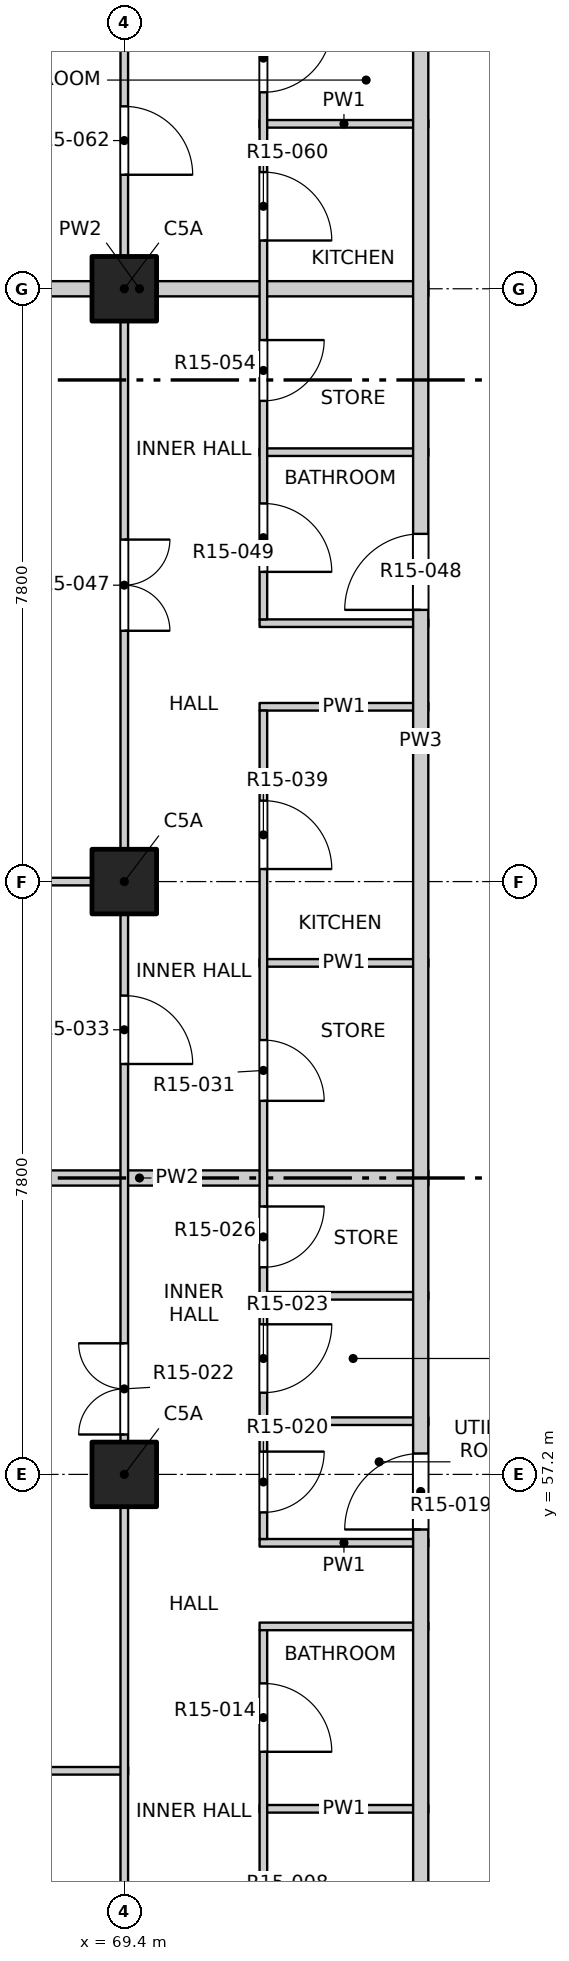
"""IFC4 building model, lengths in metres.
Left out: names, types, materials, properties, quantities, classifications, styles, units other than length and angle.
Written with IfcOpenShell. Run it as: python <this file> out.ifc"""

import sys

from ifc_helpers import new_model, si_unit, direction, frame, frame_2d, origin, origin_2d, place, context, subcontext, project, spatial, rectangle, extrude, element, fill, save


model = new_model("IFC4")
c1 = context("Model", 3, precision=1e-05, world=origin(), true_north=direction((0.0, 1.0)))
c2 = subcontext(c1, "Body", "Model", "MODEL_VIEW")
j1 = project(units=[si_unit("LENGTHUNIT", "METRE"), si_unit("PLANEANGLEUNIT", "RADIAN")], contexts=[c1])
p1 = place(None, origin())
s1 = spatial("IfcSite", under=j1, at=p1, CompositionType="ELEMENT")
p2 = place(p1, origin())
s2 = spatial("IfcBuilding", under=s1, at=p2, CompositionType="ELEMENT")
p3 = place(p2, frame((0.0, 0.0, 158.8)))
s3 = spatial("IfcBuildingStorey", under=s2, at=p3, CompositionType="ELEMENT", Elevation=158.8)
for number, where, z_axis, x_axis in (
    (1, (69.4, 57.2, -0.25), (0.0, 0.0, 1.0), (1.0, 0.0, 0.0)),
    (2, (69.4, 65.0, -0.25), (0.0, 0.0, 1.0), (1.0, 0.0, 0.0)),
    (3, (69.4, 72.8, -0.25), (0.0, 0.0, 1.0), (1.0, 0.0, 0.0)),
):
    element("IfcColumn", number, at=place(p3, frame(where, z_axis=z_axis, x_axis=x_axis)), inside=s3, PredefinedType="COLUMN", context=c2, shape_type="SweptSolid", body=[
        extrude(rectangle(XDim=0.85, YDim=0.85, at=origin_2d()), origin(), (0.0, 0.0, 1.0), 3.4),
    ])
p4 = place(p3, frame((71.18, 52.8, 0.0), z_axis=(0.0, 0.0, 1.0), x_axis=(1.0, 0.0, 0.0)))
e4 = element("IfcWall", 4, at=p4, inside=s3, PredefinedType="PARTITIONING", context=c2, shape_type="SweptSolid", body=[
    extrude(rectangle(XDim=2.22, YDim=0.1, at=frame_2d((1.11, 0.0))), origin(), (0.0, 0.0, 1.0), 3.15),
])
p5 = place(p3, frame((65.8, 53.3, 0.0), z_axis=(0.0, 0.0, 1.0), x_axis=(1.0, 0.0, 0.0)))
e5 = element("IfcWall", 5, at=p5, inside=s3, PredefinedType="PARTITIONING", context=c2, shape_type="SweptSolid", body=[
    extrude(rectangle(XDim=3.65, YDim=0.1, at=frame_2d((1.825, 0.0))), origin(), (0.0, 0.0, 1.0), 3.15),
])
for number, where, z_axis, x_axis in (
    (6, (71.18, 55.2, 0.0), (0.0, 0.0, 1.0), (1.0, 0.0, 0.0)),
    (7, (71.18, 56.3, 0.0), (0.0, 0.0, 1.0), (1.0, 0.0, 0.0)),
    (8, (71.18, 57.9, 0.0), (0.0, 0.0, 1.0), (1.0, 0.0, 0.0)),
    (9, (71.18, 59.55, 0.0), (0.0, 0.0, 1.0), (1.0, 0.0, 0.0)),
):
    element("IfcWall", number, at=place(p3, frame(where, z_axis=z_axis, x_axis=x_axis)), inside=s3, PredefinedType="PARTITIONING", context=c2, shape_type="SweptSolid", body=[
        extrude(rectangle(XDim=2.22, YDim=0.1, at=frame_2d((1.11, 0.0))), origin(), (0.0, 0.0, 1.0), 3.15),
    ])
p6 = place(p3, frame((65.8, 61.1, 0.0), z_axis=(0.0, 0.0, 1.0), x_axis=(1.0, 0.0, 0.0)))
e10 = element("IfcWall", 10, at=p6, inside=s3, PredefinedType="PARTITIONING", context=c2, shape_type="SweptSolid", body=[
    extrude(rectangle(XDim=7.6, YDim=0.2, at=frame_2d((3.8, 0.0))), origin(), (0.0, 0.0, 1.0), 2.55),
])
p7 = place(p3, frame((71.18, 63.93, 0.0), z_axis=(0.0, 0.0, 1.0), x_axis=(1.0, 0.0, 0.0)))
e11 = element("IfcWall", 11, at=p7, inside=s3, PredefinedType="PARTITIONING", context=c2, shape_type="SweptSolid", body=[
    extrude(rectangle(XDim=2.22, YDim=0.1, at=frame_2d((1.11, 0.0))), origin(), (0.0, 0.0, 1.0), 3.15),
])
p8 = place(p3, frame((65.8, 65.0, 0.0), z_axis=(0.0, 0.0, 1.0), x_axis=(1.0, 0.0, 0.0)))
e12 = element("IfcWall", 12, at=p8, inside=s3, PredefinedType="PARTITIONING", context=c2, shape_type="SweptSolid", body=[
    extrude(rectangle(XDim=3.65, YDim=0.1, at=frame_2d((1.825, 0.0))), origin(), (0.0, 0.0, 1.0), 3.15),
])
for number, where, z_axis, x_axis in (
    (13, (71.18, 67.3, 0.0), (0.0, 0.0, 1.0), (1.0, 0.0, 0.0)),
    (14, (71.18, 68.4, 0.0), (0.0, 0.0, 1.0), (1.0, 0.0, 0.0)),
    (15, (71.18, 70.65, 0.0), (0.0, 0.0, 1.0), (1.0, 0.0, 0.0)),
):
    element("IfcWall", number, at=place(p3, frame(where, z_axis=z_axis, x_axis=x_axis)), inside=s3, PredefinedType="PARTITIONING", context=c2, shape_type="SweptSolid", body=[
        extrude(rectangle(XDim=2.22, YDim=0.1, at=frame_2d((1.11, 0.0))), origin(), (0.0, 0.0, 1.0), 3.15),
    ])
p9 = place(p3, frame((65.8, 72.8, 0.0), z_axis=(0.0, 0.0, 1.0), x_axis=(1.0, 0.0, 0.0)))
e16 = element("IfcWall", 16, at=p9, inside=s3, PredefinedType="PARTITIONING", context=c2, shape_type="SweptSolid", body=[
    extrude(rectangle(XDim=7.6, YDim=0.2, at=frame_2d((3.8, 0.0))), origin(), (0.0, 0.0, 1.0), 3.15),
])
p10 = place(p3, frame((71.18, 74.97, 0.0), z_axis=(0.0, 0.0, 1.0), x_axis=(1.0, 0.0, 0.0)))
e17 = element("IfcWall", 17, at=p10, inside=s3, PredefinedType="PARTITIONING", context=c2, shape_type="SweptSolid", body=[
    extrude(rectangle(XDim=2.22, YDim=0.1, at=frame_2d((1.11, 0.0))), origin(), (0.0, 0.0, 1.0), 3.15),
])
p11 = place(p3, frame((69.4, 45.8, 0.0), z_axis=(0.0, 0.0, 1.0), x_axis=(0.0, 1.0, 0.0)))
e18 = element("IfcWall", 18, at=p11, inside=s3, PredefinedType="PARTITIONING", context=c2, shape_type="SweptSolid", body=[
    extrude(rectangle(XDim=38.4, YDim=0.1, at=frame_2d((19.2, 0.0))), origin(), (0.0, 0.0, 1.0), 3.15),
])
p12 = place(p11, frame((1.05, 0.0, 0.0)))
e19 = element("IfcOpeningElement", 19, at=p12, cuts=e18, PredefinedType="OPENING", context=c2, shape_type="SweptSolid", body=[
    extrude(rectangle(XDim=1.2, YDim=2.1, at=frame_2d((0.6, 1.05))), frame((0.0, 0.06, 0.0), z_axis=(0.0, -1.0, 0.0), x_axis=(1.0, 0.0, 0.0)), (0.0, 0.0, 1.0), 0.12),
])
p13 = place(p11, frame((5.1, 0.0, 0.0)))
e20 = element("IfcOpeningElement", 20, at=p13, cuts=e18, PredefinedType="OPENING", context=c2, shape_type="SweptSolid", body=[
    extrude(rectangle(XDim=0.9, YDim=2.1, at=frame_2d((0.45, 1.05))), frame((0.0, 0.06, 0.0), z_axis=(0.0, -1.0, 0.0), x_axis=(1.0, 0.0, 0.0)), (0.0, 0.0, 1.0), 0.12),
])
p14 = place(p11, frame((11.925, 0.0, 0.0)))
e21 = element("IfcOpeningElement", 21, at=p14, cuts=e18, PredefinedType="OPENING", context=c2, shape_type="SweptSolid", body=[
    extrude(rectangle(XDim=1.2, YDim=2.1, at=frame_2d((0.6, 1.05))), frame((0.0, 0.06, 0.0), z_axis=(0.0, -1.0, 0.0), x_axis=(1.0, 0.0, 0.0)), (0.0, 0.0, 1.0), 0.12),
])
p15 = place(p11, frame((16.8, 0.0, 0.0)))
e22 = element("IfcOpeningElement", 22, at=p15, cuts=e18, PredefinedType="OPENING", context=c2, shape_type="SweptSolid", body=[
    extrude(rectangle(XDim=0.9, YDim=2.1, at=frame_2d((0.45, 1.05))), frame((0.0, 0.06, 0.0), z_axis=(0.0, -1.0, 0.0), x_axis=(1.0, 0.0, 0.0)), (0.0, 0.0, 1.0), 0.12),
])
p16 = place(p11, frame((22.5, 0.0, 0.0)))
e23 = element("IfcOpeningElement", 23, at=p16, cuts=e18, PredefinedType="OPENING", context=c2, shape_type="SweptSolid", body=[
    extrude(rectangle(XDim=1.2, YDim=2.1, at=frame_2d((0.6, 1.05))), frame((0.0, 0.06, 0.0), z_axis=(0.0, -1.0, 0.0), x_axis=(1.0, 0.0, 0.0)), (0.0, 0.0, 1.0), 0.12),
])
p17 = place(p11, frame((28.5, 0.0, 0.0)))
e24 = element("IfcOpeningElement", 24, at=p17, cuts=e18, PredefinedType="OPENING", context=c2, shape_type="SweptSolid", body=[
    extrude(rectangle(XDim=0.9, YDim=2.1, at=frame_2d((0.45, 1.05))), frame((0.0, 0.06, 0.0), z_axis=(0.0, -1.0, 0.0), x_axis=(1.0, 0.0, 0.0)), (0.0, 0.0, 1.0), 0.12),
])
p18 = place(p11, frame((32.4, 0.0, 0.0)))
e25 = element("IfcOpeningElement", 25, at=p18, cuts=e18, PredefinedType="OPENING", context=c2, shape_type="SweptSolid", body=[
    extrude(rectangle(XDim=0.9, YDim=2.1, at=frame_2d((0.45, 1.05))), frame((0.0, 0.06, 0.0), z_axis=(0.0, -1.0, 0.0), x_axis=(1.0, 0.0, 0.0)), (0.0, 0.0, 1.0), 0.12),
])
p19 = place(p11, frame((36.15, 0.0, 0.0)))
e26 = element("IfcOpeningElement", 26, at=p19, cuts=e18, PredefinedType="OPENING", context=c2, shape_type="SweptSolid", body=[
    extrude(rectangle(XDim=1.2, YDim=2.1, at=frame_2d((0.6, 1.05))), frame((0.0, 0.06, 0.0), z_axis=(0.0, -1.0, 0.0), x_axis=(1.0, 0.0, 0.0)), (0.0, 0.0, 1.0), 0.12),
])
p20 = place(p3, frame((71.23, 49.45, 0.0), z_axis=(0.0, 0.0, 1.0), x_axis=(0.0, 1.0, 0.0)))
e27 = element("IfcWall", 27, at=p20, inside=s3, PredefinedType="PARTITIONING", context=c2, shape_type="SweptSolid", body=[
    extrude(rectangle(XDim=5.7, YDim=0.1, at=frame_2d((2.85, 0.0))), origin(), (0.0, 0.0, 1.0), 3.15),
])
p21 = place(p20, frame((1.2, 0.0, 0.0)))
e28 = element("IfcOpeningElement", 28, at=p21, cuts=e27, PredefinedType="OPENING", context=c2, shape_type="SweptSolid", body=[
    extrude(rectangle(XDim=0.9, YDim=2.1, at=frame_2d((0.45, 1.05))), frame((0.0, 0.06, 0.0), z_axis=(0.0, -1.0, 0.0), x_axis=(1.0, 0.0, 0.0)), (0.0, 0.0, 1.0), 0.12),
])
p22 = place(p20, frame((4.1, 0.0, 0.0)))
e29 = element("IfcOpeningElement", 29, at=p22, cuts=e27, PredefinedType="OPENING", context=c2, shape_type="SweptSolid", body=[
    extrude(rectangle(XDim=0.9, YDim=2.1, at=frame_2d((0.45, 1.05))), frame((0.0, 0.06, 0.0), z_axis=(0.0, -1.0, 0.0), x_axis=(1.0, 0.0, 0.0)), (0.0, 0.0, 1.0), 0.12),
])
p23 = place(p3, frame((71.23, 56.35, 0.0), z_axis=(0.0, 0.0, 1.0), x_axis=(0.0, 1.0, 0.0)))
e30 = element("IfcWall", 30, at=p23, inside=s3, PredefinedType="PARTITIONING", context=c2, shape_type="SweptSolid", body=[
    extrude(rectangle(XDim=10.9, YDim=0.1, at=frame_2d((5.45, 0.0))), origin(), (0.0, 0.0, 1.0), 3.15),
])
p24 = place(p23, frame((0.35, 0.0, 0.0)))
e31 = element("IfcOpeningElement", 31, at=p24, cuts=e30, PredefinedType="OPENING", context=c2, shape_type="SweptSolid", body=[
    extrude(rectangle(XDim=0.8, YDim=2.1, at=frame_2d((0.4, 1.05))), frame((0.0, 0.06, 0.0), z_axis=(0.0, -1.0, 0.0), x_axis=(1.0, 0.0, 0.0)), (0.0, 0.0, 1.0), 0.12),
])
p25 = place(p23, frame((1.925, 0.0, 0.0)))
e32 = element("IfcOpeningElement", 32, at=p25, cuts=e30, PredefinedType="OPENING", context=c2, shape_type="SweptSolid", body=[
    extrude(rectangle(XDim=0.9, YDim=2.1, at=frame_2d((0.45, 1.05))), frame((0.0, 0.06, 0.0), z_axis=(0.0, -1.0, 0.0), x_axis=(1.0, 0.0, 0.0)), (0.0, 0.0, 1.0), 0.12),
])
p26 = place(p23, frame((3.575, 0.0, 0.0)))
e33 = element("IfcOpeningElement", 33, at=p26, cuts=e30, PredefinedType="OPENING", context=c2, shape_type="SweptSolid", body=[
    extrude(rectangle(XDim=0.8, YDim=2.1, at=frame_2d((0.4, 1.05))), frame((0.0, 0.06, 0.0), z_axis=(0.0, -1.0, 0.0), x_axis=(1.0, 0.0, 0.0)), (0.0, 0.0, 1.0), 0.12),
])
p27 = place(p23, frame((5.765, 0.0, 0.0)))
e34 = element("IfcOpeningElement", 34, at=p27, cuts=e30, PredefinedType="OPENING", context=c2, shape_type="SweptSolid", body=[
    extrude(rectangle(XDim=0.8, YDim=2.1, at=frame_2d((0.4, 1.05))), frame((0.0, 0.06, 0.0), z_axis=(0.0, -1.0, 0.0), x_axis=(1.0, 0.0, 0.0)), (0.0, 0.0, 1.0), 0.12),
])
p28 = place(p23, frame((8.815, 0.0, 0.0)))
e35 = element("IfcOpeningElement", 35, at=p28, cuts=e30, PredefinedType="OPENING", context=c2, shape_type="SweptSolid", body=[
    extrude(rectangle(XDim=0.9, YDim=2.1, at=frame_2d((0.45, 1.05))), frame((0.0, 0.06, 0.0), z_axis=(0.0, -1.0, 0.0), x_axis=(1.0, 0.0, 0.0)), (0.0, 0.0, 1.0), 0.12),
])
p29 = place(p3, frame((71.23, 68.45, 0.0), z_axis=(0.0, 0.0, 1.0), x_axis=(0.0, 1.0, 0.0)))
e36 = element("IfcWall", 36, at=p29, inside=s3, PredefinedType="PARTITIONING", context=c2, shape_type="SweptSolid", body=[
    extrude(rectangle(XDim=9.85, YDim=0.1, at=frame_2d((4.925, 0.0))), origin(), (0.0, 0.0, 1.0), 3.15),
])
p30 = place(p29, frame((0.625, 0.0, 0.0)))
e37 = element("IfcOpeningElement", 37, at=p30, cuts=e36, PredefinedType="OPENING", context=c2, shape_type="SweptSolid", body=[
    extrude(rectangle(XDim=0.9, YDim=2.1, at=frame_2d((0.45, 1.05))), frame((0.0, 0.06, 0.0), z_axis=(0.0, -1.0, 0.0), x_axis=(1.0, 0.0, 0.0)), (0.0, 0.0, 1.0), 0.12),
])
p31 = place(p29, frame((2.875, 0.0, 0.0)))
e38 = element("IfcOpeningElement", 38, at=p31, cuts=e36, PredefinedType="OPENING", context=c2, shape_type="SweptSolid", body=[
    extrude(rectangle(XDim=0.8, YDim=2.1, at=frame_2d((0.4, 1.05))), frame((0.0, 0.06, 0.0), z_axis=(0.0, -1.0, 0.0), x_axis=(1.0, 0.0, 0.0)), (0.0, 0.0, 1.0), 0.12),
])
p32 = place(p29, frame((4.985, 0.0, 0.0)))
e39 = element("IfcOpeningElement", 39, at=p32, cuts=e36, PredefinedType="OPENING", context=c2, shape_type="SweptSolid", body=[
    extrude(rectangle(XDim=0.9, YDim=2.1, at=frame_2d((0.45, 1.05))), frame((0.0, 0.06, 0.0), z_axis=(0.0, -1.0, 0.0), x_axis=(1.0, 0.0, 0.0)), (0.0, 0.0, 1.0), 0.12),
])
p33 = place(p29, frame((6.935, 0.0, 0.0)))
e40 = element("IfcOpeningElement", 40, at=p33, cuts=e36, PredefinedType="OPENING", context=c2, shape_type="SweptSolid", body=[
    extrude(rectangle(XDim=0.9, YDim=2.1, at=frame_2d((0.45, 1.05))), frame((0.0, 0.06, 0.0), z_axis=(0.0, -1.0, 0.0), x_axis=(1.0, 0.0, 0.0)), (0.0, 0.0, 1.0), 0.12),
])
p34 = place(p29, frame((8.625, 0.0, 0.0)))
e41 = element("IfcOpeningElement", 41, at=p34, cuts=e36, PredefinedType="OPENING", context=c2, shape_type="SweptSolid", body=[
    extrude(rectangle(XDim=0.9, YDim=2.1, at=frame_2d((0.45, 1.05))), frame((0.0, 0.06, 0.0), z_axis=(0.0, -1.0, 0.0), x_axis=(1.0, 0.0, 0.0)), (0.0, 0.0, 1.0), 0.12),
])
p35 = place(p3, frame((73.3, 49.5, 0.0), z_axis=(0.0, 0.0, 1.0), x_axis=(0.0, 1.0, 0.0)))
e42 = element("IfcWall", 42, at=p35, inside=s3, PredefinedType="PARTITIONING", context=c2, shape_type="SweptSolid", body=[
    extrude(rectangle(XDim=34.7, YDim=0.2, at=frame_2d((17.35, 0.0))), origin(), (0.0, 0.0, 1.0), 3.15),
])
p36 = place(p35, frame((6.975, 0.0, 0.0)))
e43 = element("IfcOpeningElement", 43, at=p36, cuts=e42, PredefinedType="OPENING", context=c2, shape_type="SweptSolid", body=[
    extrude(rectangle(XDim=1.0, YDim=2.1, at=frame_2d((0.5, 1.05))), frame((0.0, 0.11, 0.0), z_axis=(0.0, -1.0, 0.0), x_axis=(1.0, 0.0, 0.0)), (0.0, 0.0, 1.0), 0.22),
])
p37 = place(p35, frame((19.075, 0.0, 0.0)))
e44 = element("IfcOpeningElement", 44, at=p37, cuts=e42, PredefinedType="OPENING", context=c2, shape_type="SweptSolid", body=[
    extrude(rectangle(XDim=1.0, YDim=2.1, at=frame_2d((0.5, 1.05))), frame((0.0, 0.11, 0.0), z_axis=(0.0, -1.0, 0.0), x_axis=(1.0, 0.0, 0.0)), (0.0, 0.0, 1.0), 0.22),
])
p38 = place(p35, frame((27.675, 0.0, 0.0)))
e45 = element("IfcOpeningElement", 45, at=p38, cuts=e42, PredefinedType="OPENING", context=c2, shape_type="SweptSolid", body=[
    extrude(rectangle(XDim=1.0, YDim=2.1, at=frame_2d((0.5, 1.05))), frame((0.0, 0.11, 0.0), z_axis=(0.0, -1.0, 0.0), x_axis=(1.0, 0.0, 0.0)), (0.0, 0.0, 1.0), 0.22),
])
p39 = place(p22, origin())
e46 = element("IfcDoor", 46, at=p39, inside=s3, OperationType="SINGLE_SWING_RIGHT", PredefinedType="DOOR", context=c2, shape_type="SweptSolid", body=[
    extrude(rectangle(XDim=0.9, YDim=2.1, at=frame_2d((0.45, 1.05))), frame((0.0, 0.025, 0.0), z_axis=(0.0, -1.0, 0.0), x_axis=(1.0, 0.0, 0.0)), (0.0, 0.0, 1.0), 0.05),
])
fill(e29, e46)
p40 = place(p36, origin())
e47 = element("IfcDoor", 47, at=p40, inside=s3, OperationType="SINGLE_SWING_RIGHT", PredefinedType="DOOR", context=c2, shape_type="SweptSolid", body=[
    extrude(rectangle(XDim=1.0, YDim=2.1, at=frame_2d((0.5, 1.05))), frame((0.0, 0.025, 0.0), z_axis=(0.0, -1.0, 0.0), x_axis=(1.0, 0.0, 0.0)), (0.0, 0.0, 1.0), 0.05),
])
fill(e43, e47)
p41 = place(p24, origin())
e48 = element("IfcDoor", 48, at=p41, inside=s3, OperationType="SINGLE_SWING_LEFT", PredefinedType="DOOR", context=c2, shape_type="SweptSolid", body=[
    extrude(rectangle(XDim=0.8, YDim=2.1, at=frame_2d((0.4, 1.05))), frame((0.0, 0.025, 0.0), z_axis=(0.0, -1.0, 0.0), x_axis=(1.0, 0.0, 0.0)), (0.0, 0.0, 1.0), 0.05),
])
fill(e31, e48)
p42 = place(p14, origin())
e49 = element("IfcDoor", 49, at=p42, inside=s3, OperationType="DOUBLE_DOOR_SINGLE_SWING", PredefinedType="DOOR", context=c2, shape_type="SweptSolid", body=[
    extrude(rectangle(XDim=1.2, YDim=2.1, at=frame_2d((0.6, 1.05))), frame((0.0, 0.025, 0.0), z_axis=(0.0, -1.0, 0.0), x_axis=(1.0, 0.0, 0.0)), (0.0, 0.0, 1.0), 0.05),
])
fill(e21, e49)
p43 = place(p25, origin())
e50 = element("IfcDoor", 50, at=p43, inside=s3, OperationType="SINGLE_SWING_LEFT", PredefinedType="DOOR", context=c2, shape_type="SweptSolid", body=[
    extrude(rectangle(XDim=0.9, YDim=2.1, at=frame_2d((0.45, 1.05))), frame((0.0, 0.025, 0.0), z_axis=(0.0, -1.0, 0.0), x_axis=(1.0, 0.0, 0.0)), (0.0, 0.0, 1.0), 0.05),
])
fill(e32, e50)
p44 = place(p26, origin())
e51 = element("IfcDoor", 51, at=p44, inside=s3, OperationType="SINGLE_SWING_LEFT", PredefinedType="DOOR", context=c2, shape_type="SweptSolid", body=[
    extrude(rectangle(XDim=0.8, YDim=2.1, at=frame_2d((0.4, 1.05))), frame((0.0, 0.025, 0.0), z_axis=(0.0, -1.0, 0.0), x_axis=(1.0, 0.0, 0.0)), (0.0, 0.0, 1.0), 0.05),
])
fill(e33, e51)
p45 = place(p27, origin())
e52 = element("IfcDoor", 52, at=p45, inside=s3, OperationType="SINGLE_SWING_RIGHT", PredefinedType="DOOR", context=c2, shape_type="SweptSolid", body=[
    extrude(rectangle(XDim=0.8, YDim=2.1, at=frame_2d((0.4, 1.05))), frame((0.0, 0.025, 0.0), z_axis=(0.0, -1.0, 0.0), x_axis=(1.0, 0.0, 0.0)), (0.0, 0.0, 1.0), 0.05),
])
fill(e34, e52)
p46 = place(p15, origin())
e53 = element("IfcDoor", 53, at=p46, inside=s3, OperationType="SINGLE_SWING_RIGHT", PredefinedType="DOOR", context=c2, shape_type="SweptSolid", body=[
    extrude(rectangle(XDim=0.9, YDim=2.1, at=frame_2d((0.45, 1.05))), frame((0.0, 0.025, 0.0), z_axis=(0.0, -1.0, 0.0), x_axis=(1.0, 0.0, 0.0)), (0.0, 0.0, 1.0), 0.05),
])
fill(e22, e53)
p47 = place(p28, origin())
e54 = element("IfcDoor", 54, at=p47, inside=s3, OperationType="SINGLE_SWING_RIGHT", PredefinedType="DOOR", context=c2, shape_type="SweptSolid", body=[
    extrude(rectangle(XDim=0.9, YDim=2.1, at=frame_2d((0.45, 1.05))), frame((0.0, 0.025, 0.0), z_axis=(0.0, -1.0, 0.0), x_axis=(1.0, 0.0, 0.0)), (0.0, 0.0, 1.0), 0.05),
])
fill(e35, e54)
p48 = place(p16, origin())
e55 = element("IfcDoor", 55, at=p48, inside=s3, OperationType="DOUBLE_DOOR_SINGLE_SWING", PredefinedType="DOOR", context=c2, shape_type="SweptSolid", body=[
    extrude(rectangle(XDim=1.2, YDim=2.1, at=frame_2d((0.6, 1.05))), frame((0.0, 0.025, 0.0), z_axis=(0.0, -1.0, 0.0), x_axis=(1.0, 0.0, 0.0)), (0.0, 0.0, 1.0), 0.05),
])
fill(e23, e55)
p49 = place(p37, origin())
e56 = element("IfcDoor", 56, at=p49, inside=s3, OperationType="SINGLE_SWING_RIGHT", PredefinedType="DOOR", context=c2, shape_type="SweptSolid", body=[
    extrude(rectangle(XDim=1.0, YDim=2.1, at=frame_2d((0.5, 1.05))), frame((0.0, 0.025, 0.0), z_axis=(0.0, -1.0, 0.0), x_axis=(1.0, 0.0, 0.0)), (0.0, 0.0, 1.0), 0.05),
])
fill(e44, e56)
p50 = place(p30, origin())
e57 = element("IfcDoor", 57, at=p50, inside=s3, OperationType="SINGLE_SWING_RIGHT", PredefinedType="DOOR", context=c2, shape_type="SweptSolid", body=[
    extrude(rectangle(XDim=0.9, YDim=2.1, at=frame_2d((0.45, 1.05))), frame((0.0, 0.025, 0.0), z_axis=(0.0, -1.0, 0.0), x_axis=(1.0, 0.0, 0.0)), (0.0, 0.0, 1.0), 0.05),
])
fill(e37, e57)
p51 = place(p31, origin())
e58 = element("IfcDoor", 58, at=p51, inside=s3, OperationType="SINGLE_SWING_LEFT", PredefinedType="DOOR", context=c2, shape_type="SweptSolid", body=[
    extrude(rectangle(XDim=0.8, YDim=2.1, at=frame_2d((0.4, 1.05))), frame((0.0, 0.025, 0.0), z_axis=(0.0, -1.0, 0.0), x_axis=(1.0, 0.0, 0.0)), (0.0, 0.0, 1.0), 0.05),
])
fill(e38, e58)
p52 = place(p32, origin())
e59 = element("IfcDoor", 59, at=p52, inside=s3, OperationType="SINGLE_SWING_RIGHT", PredefinedType="DOOR", context=c2, shape_type="SweptSolid", body=[
    extrude(rectangle(XDim=0.9, YDim=2.1, at=frame_2d((0.45, 1.05))), frame((0.0, 0.025, 0.0), z_axis=(0.0, -1.0, 0.0), x_axis=(1.0, 0.0, 0.0)), (0.0, 0.0, 1.0), 0.05),
])
fill(e39, e59)
p53 = place(p17, origin())
e60 = element("IfcDoor", 60, at=p53, inside=s3, OperationType="SINGLE_SWING_RIGHT", PredefinedType="DOOR", context=c2, shape_type="SweptSolid", body=[
    extrude(rectangle(XDim=0.9, YDim=2.1, at=frame_2d((0.45, 1.05))), frame((0.0, 0.025, 0.0), z_axis=(0.0, -1.0, 0.0), x_axis=(1.0, 0.0, 0.0)), (0.0, 0.0, 1.0), 0.05),
])
fill(e24, e60)
p54 = place(p33, origin())
e61 = element("IfcDoor", 61, at=p54, inside=s3, OperationType="SINGLE_SWING_LEFT", PredefinedType="DOOR", context=c2, shape_type="SweptSolid", body=[
    extrude(rectangle(XDim=0.9, YDim=2.1, at=frame_2d((0.45, 1.05))), frame((0.0, 0.025, 0.0), z_axis=(0.0, -1.0, 0.0), x_axis=(1.0, 0.0, 0.0)), (0.0, 0.0, 1.0), 0.05),
])
fill(e40, e61)
save(model, sys.argv[1])
